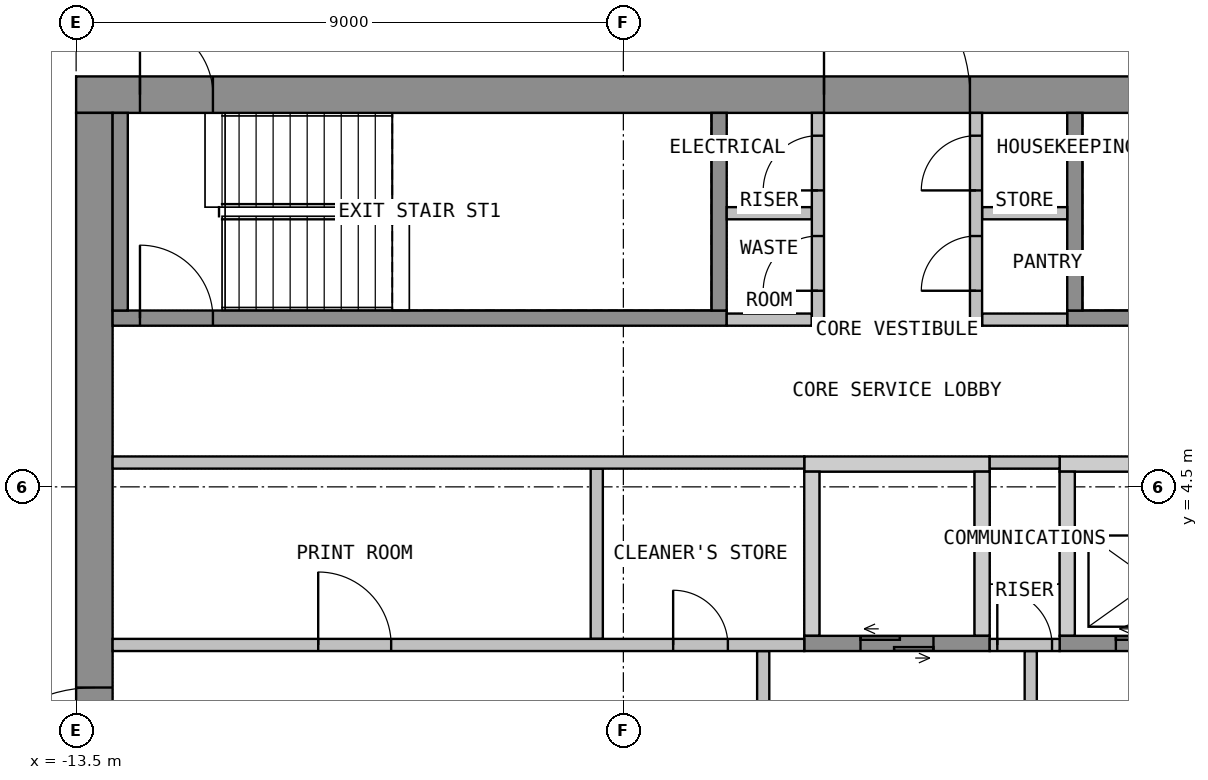
"""IFC4 building model, lengths in metres.
Left out: names, types, materials, properties, quantities, classifications, styles, units other than length and angle.
Written with IfcOpenShell. Run it as: python <this file> out.ifc"""

import sys

from ifc_helpers import new_model, si_unit, direction, frame, frame_2d, origin, place, context, subcontext, project, spatial, polyline, rectangle, outline, extrude, element, fill, save


model = new_model("IFC4")
c1 = context("Model", 3, precision=1e-05, world=origin(), true_north=direction((0.0, 1.0)))
c2 = subcontext(c1, "Body", "Model", "MODEL_VIEW")
j1 = project(units=[si_unit("LENGTHUNIT", "METRE"), si_unit("PLANEANGLEUNIT", "RADIAN")], contexts=[c1])
p1 = place(None, origin())
s1 = spatial("IfcSite", under=j1, at=p1, CompositionType="ELEMENT")
p2 = place(p1, origin())
s2 = spatial("IfcBuilding", under=s1, at=p2, CompositionType="ELEMENT")
p3 = place(p2, frame((0.0, 0.0, 235.2)))
s3 = spatial("IfcBuildingStorey", under=s2, at=p3, CompositionType="ELEMENT", Elevation=235.2)
p4 = place(p3, frame((-13.5, 10.95, 0.0), z_axis=(0.0, 0.0, 1.0), x_axis=(1.0, 0.0, 0.0)))
e1 = element("IfcWall", 1, at=p4, inside=s3, PredefinedType="SHEAR", context=c2, shape_type="SweptSolid", body=[
    extrude(rectangle(XDim=27.0, YDim=0.6, at=frame_2d((13.5, 0.0))), origin(), (0.0, 0.0, 1.0), 3.575),
])
p5 = place(p4, frame((12.3, 0.0, 0.0)))
e2 = element("IfcOpeningElement", 2, at=p5, cuts=e1, PredefinedType="OPENING", context=c2, shape_type="SweptSolid", body=[
    extrude(rectangle(XDim=2.4, YDim=2.1, at=frame_2d((1.2, 1.05))), frame((0.0, 0.31, 0.0), z_axis=(0.0, -1.0, 0.0), x_axis=(1.0, 0.0, 0.0)), (0.0, 0.0, 1.0), 0.62),
])
p6 = place(p4, frame((1.05, 0.0, 0.0)))
e3 = element("IfcOpeningElement", 3, at=p6, cuts=e1, PredefinedType="OPENING", context=c2, shape_type="SweptSolid", body=[
    extrude(rectangle(XDim=1.2, YDim=2.1, at=frame_2d((0.6, 1.05))), frame((0.0, 0.31, 0.0), z_axis=(0.0, -1.0, 0.0), x_axis=(1.0, 0.0, 0.0)), (0.0, 0.0, 1.0), 0.62),
])
p7 = place(p4, frame((24.75, 0.0, 0.0)))
e4 = element("IfcOpeningElement", 4, at=p7, cuts=e1, PredefinedType="OPENING", context=c2, shape_type="SweptSolid", body=[
    extrude(rectangle(XDim=1.2, YDim=2.1, at=frame_2d((0.6, 1.05))), frame((0.0, 0.31, 0.0), z_axis=(0.0, -1.0, 0.0), x_axis=(1.0, 0.0, 0.0)), (0.0, 0.0, 1.0), 0.62),
])
p8 = place(p3, frame((-13.2, -10.65, 0.0), z_axis=(0.0, 0.0, 1.0), x_axis=(0.0, 1.0, 0.0)))
e5 = element("IfcWall", 5, at=p8, inside=s3, PredefinedType="SHEAR", context=c2, shape_type="SweptSolid", body=[
    extrude(rectangle(XDim=21.3, YDim=0.6, at=frame_2d((10.65, 0.0))), origin(), (0.0, 0.0, 1.0), 3.575),
])
p9 = place(p8, frame((9.45, 0.0, 0.0)))
e6 = element("IfcOpeningElement", 6, at=p9, cuts=e5, PredefinedType="OPENING", context=c2, shape_type="SweptSolid", body=[
    extrude(rectangle(XDim=2.4, YDim=2.1, at=frame_2d((1.2, 1.05))), frame((0.0, 0.31, 0.0), z_axis=(0.0, -1.0, 0.0), x_axis=(1.0, 0.0, 0.0)), (0.0, 0.0, 1.0), 0.62),
])
p10 = place(p3, origin())
e7 = element("IfcWall", 7, at=p10, inside=s3, PredefinedType="SHEAR", context=c2, shape_type="SweptSolid", body=[
    extrude(outline(polyline([(-1.525, 4.75), (1.525, 4.75), (1.525, 5.0), (-1.525, 5.0), (-1.525, 4.75)])), origin(), (0.0, 0.0, 1.0), 3.575),
])
p11 = place(p3, origin())
e8 = element("IfcWall", 8, at=p11, inside=s3, PredefinedType="SHEAR", context=c2, shape_type="SweptSolid", body=[
    extrude(outline(polyline([(2.675, 4.75), (8.525, 4.75), (8.525, 5.0), (2.675, 5.0), (2.675, 4.75)])), origin(), (0.0, 0.0, 1.0), 3.575),
])
p12 = place(p3, origin())
e9 = element("IfcWall", 9, at=p12, inside=s3, PredefinedType="SHEAR", context=c2, shape_type="SweptSolid", body=[
    extrude(outline(polyline([(-1.525, 2.05), (-1.275, 2.05), (-1.275, 4.75), (-1.525, 4.75), (-1.525, 2.05)])), origin(), (0.0, 0.0, 1.0), 3.575),
])
p13 = place(p3, origin())
e10 = element("IfcWall", 10, at=p13, inside=s3, PredefinedType="SHEAR", context=c2, shape_type="SweptSolid", body=[
    extrude(outline(polyline([(1.275, 2.05), (1.525, 2.05), (1.525, 4.75), (1.275, 4.75), (1.275, 2.05)])), origin(), (0.0, 0.0, 1.0), 3.575),
])
p14 = place(p3, origin())
e11 = element("IfcWall", 11, at=p14, inside=s3, PredefinedType="SHEAR", context=c2, shape_type="SweptSolid", body=[
    extrude(outline(polyline([(2.675, 2.05), (2.925, 2.05), (2.925, 4.75), (2.675, 4.75), (2.675, 2.05)])), origin(), (0.0, 0.0, 1.0), 3.575),
])
p15 = place(p3, frame((-1.525, 1.925, 0.0), z_axis=(0.0, 0.0, 1.0), x_axis=(1.0, 0.0, 0.0)))
e12 = element("IfcWall", 12, at=p15, inside=s3, PredefinedType="SHEAR", context=c2, shape_type="SweptSolid", body=[
    extrude(rectangle(XDim=3.05, YDim=0.25, at=frame_2d((1.525, 0.0))), origin(), (0.0, 0.0, 1.0), 3.575),
])
p16 = place(p15, frame((0.925, 0.0, 0.0)))
e13 = element("IfcOpeningElement", 13, at=p16, cuts=e12, PredefinedType="OPENING", context=c2, shape_type="SweptSolid", body=[
    extrude(rectangle(XDim=1.2, YDim=2.1, at=frame_2d((0.6, 1.05))), frame((0.0, 0.135, 0.0), z_axis=(0.0, -1.0, 0.0), x_axis=(1.0, 0.0, 0.0)), (0.0, 0.0, 1.0), 0.27),
])
p17 = place(p3, frame((2.675, 1.925, 0.0), z_axis=(0.0, 0.0, 1.0), x_axis=(1.0, 0.0, 0.0)))
e14 = element("IfcWall", 14, at=p17, inside=s3, PredefinedType="SHEAR", context=c2, shape_type="SweptSolid", body=[
    extrude(rectangle(XDim=5.85, YDim=0.25, at=frame_2d((2.925, 0.0))), origin(), (0.0, 0.0, 1.0), 3.575),
])
p18 = place(p17, frame((0.925, 0.0, 0.0)))
e15 = element("IfcOpeningElement", 15, at=p18, cuts=e14, PredefinedType="OPENING", context=c2, shape_type="SweptSolid", body=[
    extrude(rectangle(XDim=1.2, YDim=2.1, at=frame_2d((0.6, 1.05))), frame((0.0, 0.135, 0.0), z_axis=(0.0, -1.0, 0.0), x_axis=(1.0, 0.0, 0.0)), (0.0, 0.0, 1.0), 0.27),
])
p19 = place(p17, frame((3.725, 0.0, 0.0)))
e16 = element("IfcOpeningElement", 16, at=p19, cuts=e14, PredefinedType="OPENING", context=c2, shape_type="SweptSolid", body=[
    extrude(rectangle(XDim=1.2, YDim=2.1, at=frame_2d((0.6, 1.05))), frame((0.0, 0.135, 0.0), z_axis=(0.0, -1.0, 0.0), x_axis=(1.0, 0.0, 0.0)), (0.0, 0.0, 1.0), 0.27),
])
p20 = place(p3, frame((-2.2, -1.8, 0.0), z_axis=(0.0, 0.0, 1.0), x_axis=(0.0, 1.0, 0.0)))
e17 = element("IfcWall", 17, at=p20, inside=s3, PredefinedType="PARTITIONING", context=c2, shape_type="SweptSolid", body=[
    extrude(rectangle(XDim=3.6, YDim=0.2, at=frame_2d((1.8, 0.0))), origin(), (0.0, 0.0, 1.0), 3.575),
])
p21 = place(p20, frame((1.2, 0.0, 0.0)))
e18 = element("IfcOpeningElement", 18, at=p21, cuts=e17, PredefinedType="OPENING", context=c2, shape_type="SweptSolid", body=[
    extrude(rectangle(XDim=1.2, YDim=2.1, at=frame_2d((0.6, 1.05))), frame((0.0, 0.11, 0.0), z_axis=(0.0, -1.0, 0.0), x_axis=(1.0, 0.0, 0.0)), (0.0, 0.0, 1.0), 0.22),
])
p22 = place(p3, frame((2.2, -1.8, 0.0), z_axis=(0.0, 0.0, 1.0), x_axis=(0.0, 1.0, 0.0)))
e19 = element("IfcWall", 19, at=p22, inside=s3, PredefinedType="PARTITIONING", context=c2, shape_type="SweptSolid", body=[
    extrude(rectangle(XDim=3.6, YDim=0.2, at=frame_2d((1.8, 0.0))), origin(), (0.0, 0.0, 1.0), 3.575),
])
p23 = place(p22, frame((1.2, 0.0, 0.0)))
e20 = element("IfcOpeningElement", 20, at=p23, cuts=e19, PredefinedType="OPENING", context=c2, shape_type="SweptSolid", body=[
    extrude(rectangle(XDim=1.2, YDim=2.1, at=frame_2d((0.6, 1.05))), frame((0.0, 0.11, 0.0), z_axis=(0.0, -1.0, 0.0), x_axis=(1.0, 0.0, 0.0)), (0.0, 0.0, 1.0), 0.22),
])
p24 = place(p3, frame((-12.9, 7.275, 0.0), z_axis=(0.0, 0.0, 1.0), x_axis=(1.0, 0.0, 0.0)))
e21 = element("IfcWall", 21, at=p24, inside=s3, PredefinedType="SHEAR", context=c2, shape_type="SweptSolid", body=[
    extrude(rectangle(XDim=10.1, YDim=0.25, at=frame_2d((5.05, 0.0))), origin(), (0.0, 0.0, 1.0), 3.575),
])
p25 = place(p24, frame((0.45, 0.0, 0.0)))
e22 = element("IfcOpeningElement", 22, at=p25, cuts=e21, PredefinedType="OPENING", context=c2, shape_type="SweptSolid", body=[
    extrude(rectangle(XDim=1.2, YDim=2.1, at=frame_2d((0.6, 1.05))), frame((0.0, 0.135, 0.0), z_axis=(0.0, -1.0, 0.0), x_axis=(1.0, 0.0, 0.0)), (0.0, 0.0, 1.0), 0.27),
])
for number, where, z_axis, x_axis in (
    (23, (-12.775, 7.4, 0.0), (0.0, 0.0, 1.0), (0.0, 1.0, 0.0)),
    (24, (-2.925, 7.4, 0.0), (0.0, 0.0, 1.0), (0.0, 1.0, 0.0)),
):
    element("IfcWall", number, at=place(p3, frame(where, z_axis=z_axis, x_axis=x_axis)), inside=s3, PredefinedType="SHEAR", context=c2, shape_type="SweptSolid", body=[
        extrude(rectangle(XDim=3.25, YDim=0.25, at=frame_2d((1.625, 0.0))), origin(), (0.0, 0.0, 1.0), 3.575),
    ])
p26 = place(p3, frame((2.8, 7.275, 0.0), z_axis=(0.0, 0.0, 1.0), x_axis=(1.0, 0.0, 0.0)))
e25 = element("IfcWall", 25, at=p26, inside=s3, PredefinedType="SHEAR", context=c2, shape_type="SweptSolid", body=[
    extrude(rectangle(XDim=10.1, YDim=0.25, at=frame_2d((5.05, 0.0))), origin(), (0.0, 0.0, 1.0), 3.575),
])
p27 = place(p26, frame((8.45, 0.0, 0.0)))
e26 = element("IfcOpeningElement", 26, at=p27, cuts=e25, PredefinedType="OPENING", context=c2, shape_type="SweptSolid", body=[
    extrude(rectangle(XDim=1.2, YDim=2.1, at=frame_2d((0.6, 1.05))), frame((0.0, 0.135, 0.0), z_axis=(0.0, -1.0, 0.0), x_axis=(1.0, 0.0, 0.0)), (0.0, 0.0, 1.0), 0.27),
])
p28 = place(p3, frame((2.925, 7.4, 0.0), z_axis=(0.0, 0.0, 1.0), x_axis=(0.0, 1.0, 0.0)))
e27 = element("IfcWall", 27, at=p28, inside=s3, PredefinedType="SHEAR", context=c2, shape_type="SweptSolid", body=[
    extrude(rectangle(XDim=3.25, YDim=0.25, at=frame_2d((1.625, 0.0))), origin(), (0.0, 0.0, 1.0), 3.575),
])
for number, where, z_axis, x_axis in (
    (28, (-2.8, 7.25, 0.0), (0.0, 0.0, 1.0), (1.0, 0.0, 0.0)),
    (29, (-2.8, 9.0, 0.0), (0.0, 0.0, 1.0), (1.0, 0.0, 0.0)),
    (30, (1.4, 7.25, 0.0), (0.0, 0.0, 1.0), (1.0, 0.0, 0.0)),
    (31, (1.4, 9.0, 0.0), (0.0, 0.0, 1.0), (1.0, 0.0, 0.0)),
):
    element("IfcWall", number, at=place(p3, frame(where, z_axis=z_axis, x_axis=x_axis)), inside=s3, PredefinedType="PARTITIONING", context=c2, shape_type="SweptSolid", body=[
        extrude(rectangle(XDim=1.4, YDim=0.2, at=frame_2d((0.7, 0.0))), origin(), (0.0, 0.0, 1.0), 3.575),
    ])
p29 = place(p3, frame((-1.3, 7.15, 0.0), z_axis=(0.0, 0.0, 1.0), x_axis=(0.0, 1.0, 0.0)))
e32 = element("IfcWall", 32, at=p29, inside=s3, PredefinedType="PARTITIONING", context=c2, shape_type="SweptSolid", body=[
    extrude(rectangle(XDim=3.5, YDim=0.2, at=frame_2d((1.75, 0.0))), origin(), (0.0, 0.0, 1.0), 3.575),
])
p30 = place(p29, frame((0.575, 0.0, 0.0)))
e33 = element("IfcOpeningElement", 33, at=p30, cuts=e32, PredefinedType="OPENING", context=c2, shape_type="SweptSolid", body=[
    extrude(rectangle(XDim=0.9, YDim=2.1, at=frame_2d((0.45, 1.05))), frame((0.0, 0.11, 0.0), z_axis=(0.0, -1.0, 0.0), x_axis=(1.0, 0.0, 0.0)), (0.0, 0.0, 1.0), 0.22),
])
p31 = place(p29, frame((2.225, 0.0, 0.0)))
e34 = element("IfcOpeningElement", 34, at=p31, cuts=e32, PredefinedType="OPENING", context=c2, shape_type="SweptSolid", body=[
    extrude(rectangle(XDim=0.9, YDim=2.1, at=frame_2d((0.45, 1.05))), frame((0.0, 0.11, 0.0), z_axis=(0.0, -1.0, 0.0), x_axis=(1.0, 0.0, 0.0)), (0.0, 0.0, 1.0), 0.22),
])
p32 = place(p3, frame((1.3, 7.15, 0.0), z_axis=(0.0, 0.0, 1.0), x_axis=(0.0, 1.0, 0.0)))
e35 = element("IfcWall", 35, at=p32, inside=s3, PredefinedType="PARTITIONING", context=c2, shape_type="SweptSolid", body=[
    extrude(rectangle(XDim=3.5, YDim=0.2, at=frame_2d((1.75, 0.0))), origin(), (0.0, 0.0, 1.0), 3.575),
])
p33 = place(p32, frame((0.575, 0.0, 0.0)))
e36 = element("IfcOpeningElement", 36, at=p33, cuts=e35, PredefinedType="OPENING", context=c2, shape_type="SweptSolid", body=[
    extrude(rectangle(XDim=0.9, YDim=2.1, at=frame_2d((0.45, 1.05))), frame((0.0, 0.11, 0.0), z_axis=(0.0, -1.0, 0.0), x_axis=(1.0, 0.0, 0.0)), (0.0, 0.0, 1.0), 0.22),
])
p34 = place(p32, frame((2.225, 0.0, 0.0)))
e37 = element("IfcOpeningElement", 37, at=p34, cuts=e35, PredefinedType="OPENING", context=c2, shape_type="SweptSolid", body=[
    extrude(rectangle(XDim=0.9, YDim=2.1, at=frame_2d((0.45, 1.05))), frame((0.0, 0.11, 0.0), z_axis=(0.0, -1.0, 0.0), x_axis=(1.0, 0.0, 0.0)), (0.0, 0.0, 1.0), 0.22),
])
p35 = place(p3, frame((-4.938, 2.0, 0.0), z_axis=(0.0, 0.0, 1.0), x_axis=(0.0, 1.0, 0.0)))
e38 = element("IfcWall", 38, at=p35, inside=s3, PredefinedType="PARTITIONING", context=c2, shape_type="SweptSolid", body=[
    extrude(rectangle(XDim=2.8, YDim=0.2, at=frame_2d((1.4, 0.0))), origin(), (0.0, 0.0, 1.0), 3.575),
])
p36 = place(p3, frame((-12.9, 1.9, 0.0), z_axis=(0.0, 0.0, 1.0), x_axis=(1.0, 0.0, 0.0)))
e39 = element("IfcWall", 39, at=p36, inside=s3, PredefinedType="PARTITIONING", context=c2, shape_type="SweptSolid", body=[
    extrude(rectangle(XDim=11.375, YDim=0.2, at=frame_2d((5.688, 0.0))), origin(), (0.0, 0.0, 1.0), 3.575),
])
p37 = place(p36, frame((3.381, 0.0, 0.0)))
e40 = element("IfcOpeningElement", 40, at=p37, cuts=e39, PredefinedType="OPENING", context=c2, shape_type="SweptSolid", body=[
    extrude(rectangle(XDim=1.2, YDim=2.1, at=frame_2d((0.6, 1.05))), frame((0.0, 0.11, 0.0), z_axis=(0.0, -1.0, 0.0), x_axis=(1.0, 0.0, 0.0)), (0.0, 0.0, 1.0), 0.22),
])
p38 = place(p36, frame((9.219, 0.0, 0.0)))
e41 = element("IfcOpeningElement", 41, at=p38, cuts=e39, PredefinedType="OPENING", context=c2, shape_type="SweptSolid", body=[
    extrude(rectangle(XDim=0.9, YDim=2.1, at=frame_2d((0.45, 1.05))), frame((0.0, 0.11, 0.0), z_axis=(0.0, -1.0, 0.0), x_axis=(1.0, 0.0, 0.0)), (0.0, 0.0, 1.0), 0.22),
])
p39 = place(p3, frame((-12.9, 4.9, 0.0), z_axis=(0.0, 0.0, 1.0), x_axis=(1.0, 0.0, 0.0)))
e42 = element("IfcWall", 42, at=p39, inside=s3, PredefinedType="PARTITIONING", context=c2, shape_type="SweptSolid", body=[
    extrude(rectangle(XDim=11.375, YDim=0.2, at=frame_2d((5.688, 0.0))), origin(), (0.0, 0.0, 1.0), 3.575),
])
p40 = place(p3, frame((1.525, 1.9, 0.0), z_axis=(0.0, 0.0, 1.0), x_axis=(1.0, 0.0, 0.0)))
e43 = element("IfcWall", 43, at=p40, inside=s3, PredefinedType="PARTITIONING", context=c2, shape_type="SweptSolid", body=[
    extrude(rectangle(XDim=1.15, YDim=0.2, at=frame_2d((0.575, 0.0))), origin(), (0.0, 0.0, 1.0), 3.575),
])
p41 = place(p40, frame((0.125, 0.0, 0.0)))
e44 = element("IfcOpeningElement", 44, at=p41, cuts=e43, PredefinedType="OPENING", context=c2, shape_type="SweptSolid", body=[
    extrude(rectangle(XDim=0.9, YDim=2.1, at=frame_2d((0.45, 1.05))), frame((0.0, 0.11, 0.0), z_axis=(0.0, -1.0, 0.0), x_axis=(1.0, 0.0, 0.0)), (0.0, 0.0, 1.0), 0.22),
])
p42 = place(p3, frame((1.525, 4.9, 0.0), z_axis=(0.0, 0.0, 1.0), x_axis=(1.0, 0.0, 0.0)))
e45 = element("IfcWall", 45, at=p42, inside=s3, PredefinedType="PARTITIONING", context=c2, shape_type="SweptSolid", body=[
    extrude(rectangle(XDim=1.15, YDim=0.2, at=frame_2d((0.575, 0.0))), origin(), (0.0, 0.0, 1.0), 3.575),
])
p43 = place(p9, origin())
e46 = element("IfcDoor", 46, at=p43, inside=s3, OperationType="DOUBLE_DOOR_DOUBLE_SWING", PredefinedType="DOOR", context=c2, shape_type="SweptSolid", body=[
    extrude(rectangle(XDim=2.4, YDim=2.1, at=frame_2d((1.2, 1.05))), frame((0.0, 0.025, 0.0), z_axis=(0.0, -1.0, 0.0), x_axis=(1.0, 0.0, 0.0)), (0.0, 0.0, 1.0), 0.05),
])
fill(e6, e46)
p44 = place(p5, origin())
e47 = element("IfcDoor", 47, at=p44, inside=s3, OperationType="DOUBLE_DOOR_DOUBLE_SWING", PredefinedType="DOOR", context=c2, shape_type="SweptSolid", body=[
    extrude(rectangle(XDim=2.4, YDim=2.1, at=frame_2d((1.2, 1.05))), frame((0.0, 0.025, 0.0), z_axis=(0.0, -1.0, 0.0), x_axis=(1.0, 0.0, 0.0)), (0.0, 0.0, 1.0), 0.05),
])
fill(e2, e47)
p45 = place(p6, origin())
e48 = element("IfcDoor", 48, at=p45, inside=s3, OperationType="SINGLE_SWING_RIGHT", PredefinedType="DOOR", context=c2, shape_type="SweptSolid", body=[
    extrude(rectangle(XDim=1.2, YDim=2.1, at=frame_2d((0.6, 1.05))), frame((0.0, 0.025, 0.0), z_axis=(0.0, -1.0, 0.0), x_axis=(1.0, 0.0, 0.0)), (0.0, 0.0, 1.0), 0.05),
])
fill(e3, e48)
p46 = place(p16, origin())
e49 = element("IfcDoor", 49, at=p46, inside=s3, OperationType="DOUBLE_DOOR_SLIDING", PredefinedType="DOOR", context=c2, shape_type="SweptSolid", body=[
    extrude(rectangle(XDim=1.2, YDim=2.1, at=frame_2d((0.6, 1.05))), frame((0.0, 0.025, 0.0), z_axis=(0.0, -1.0, 0.0), x_axis=(1.0, 0.0, 0.0)), (0.0, 0.0, 1.0), 0.05),
])
fill(e13, e49)
p47 = place(p18, origin())
e50 = element("IfcDoor", 50, at=p47, inside=s3, OperationType="DOUBLE_DOOR_SLIDING", PredefinedType="DOOR", context=c2, shape_type="SweptSolid", body=[
    extrude(rectangle(XDim=1.2, YDim=2.1, at=frame_2d((0.6, 1.05))), frame((0.0, 0.025, 0.0), z_axis=(0.0, -1.0, 0.0), x_axis=(1.0, 0.0, 0.0)), (0.0, 0.0, 1.0), 0.05),
])
fill(e15, e50)
p48 = place(p25, origin())
e51 = element("IfcDoor", 51, at=p48, inside=s3, OperationType="SINGLE_SWING_LEFT", PredefinedType="DOOR", context=c2, shape_type="SweptSolid", body=[
    extrude(rectangle(XDim=1.2, YDim=2.1, at=frame_2d((0.6, 1.05))), frame((0.0, 0.025, 0.0), z_axis=(0.0, -1.0, 0.0), x_axis=(1.0, 0.0, 0.0)), (0.0, 0.0, 1.0), 0.05),
])
fill(e22, e51)
p49 = place(p30, origin())
e52 = element("IfcDoor", 52, at=p49, inside=s3, OperationType="SINGLE_SWING_LEFT", PredefinedType="DOOR", context=c2, shape_type="SweptSolid", body=[
    extrude(rectangle(XDim=0.9, YDim=2.1, at=frame_2d((0.45, 1.05))), frame((0.0, 0.025, 0.0), z_axis=(0.0, -1.0, 0.0), x_axis=(1.0, 0.0, 0.0)), (0.0, 0.0, 1.0), 0.05),
])
fill(e33, e52)
p50 = place(p31, origin())
e53 = element("IfcDoor", 53, at=p50, inside=s3, OperationType="SINGLE_SWING_LEFT", PredefinedType="DOOR", context=c2, shape_type="SweptSolid", body=[
    extrude(rectangle(XDim=0.9, YDim=2.1, at=frame_2d((0.45, 1.05))), frame((0.0, 0.025, 0.0), z_axis=(0.0, -1.0, 0.0), x_axis=(1.0, 0.0, 0.0)), (0.0, 0.0, 1.0), 0.05),
])
fill(e34, e53)
p51 = place(p33, origin())
e54 = element("IfcDoor", 54, at=p51, inside=s3, OperationType="SINGLE_SWING_LEFT", PredefinedType="DOOR", context=c2, shape_type="SweptSolid", body=[
    extrude(rectangle(XDim=0.9, YDim=2.1, at=frame_2d((0.45, 1.05))), frame((0.0, 0.025, 0.0), z_axis=(0.0, -1.0, 0.0), x_axis=(1.0, 0.0, 0.0)), (0.0, 0.0, 1.0), 0.05),
])
fill(e36, e54)
p52 = place(p34, origin())
e55 = element("IfcDoor", 55, at=p52, inside=s3, OperationType="SINGLE_SWING_LEFT", PredefinedType="DOOR", context=c2, shape_type="SweptSolid", body=[
    extrude(rectangle(XDim=0.9, YDim=2.1, at=frame_2d((0.45, 1.05))), frame((0.0, 0.025, 0.0), z_axis=(0.0, -1.0, 0.0), x_axis=(1.0, 0.0, 0.0)), (0.0, 0.0, 1.0), 0.05),
])
fill(e37, e55)
p53 = place(p37, origin())
e56 = element("IfcDoor", 56, at=p53, inside=s3, OperationType="SINGLE_SWING_RIGHT", PredefinedType="DOOR", context=c2, shape_type="SweptSolid", body=[
    extrude(rectangle(XDim=1.2, YDim=2.1, at=frame_2d((0.6, 1.05))), frame((0.0, 0.025, 0.0), z_axis=(0.0, -1.0, 0.0), x_axis=(1.0, 0.0, 0.0)), (0.0, 0.0, 1.0), 0.05),
])
fill(e40, e56)
p54 = place(p38, origin())
e57 = element("IfcDoor", 57, at=p54, inside=s3, OperationType="SINGLE_SWING_LEFT", PredefinedType="DOOR", context=c2, shape_type="SweptSolid", body=[
    extrude(rectangle(XDim=0.9, YDim=2.1, at=frame_2d((0.45, 1.05))), frame((0.0, 0.025, 0.0), z_axis=(0.0, -1.0, 0.0), x_axis=(1.0, 0.0, 0.0)), (0.0, 0.0, 1.0), 0.05),
])
fill(e41, e57)
p55 = place(p41, origin())
e58 = element("IfcDoor", 58, at=p55, inside=s3, OperationType="SINGLE_SWING_LEFT", PredefinedType="DOOR", context=c2, shape_type="SweptSolid", body=[
    extrude(rectangle(XDim=0.9, YDim=2.1, at=frame_2d((0.45, 1.05))), frame((0.0, 0.025, 0.0), z_axis=(0.0, -1.0, 0.0), x_axis=(1.0, 0.0, 0.0)), (0.0, 0.0, 1.0), 0.05),
])
fill(e44, e58)
save(model, sys.argv[1])
